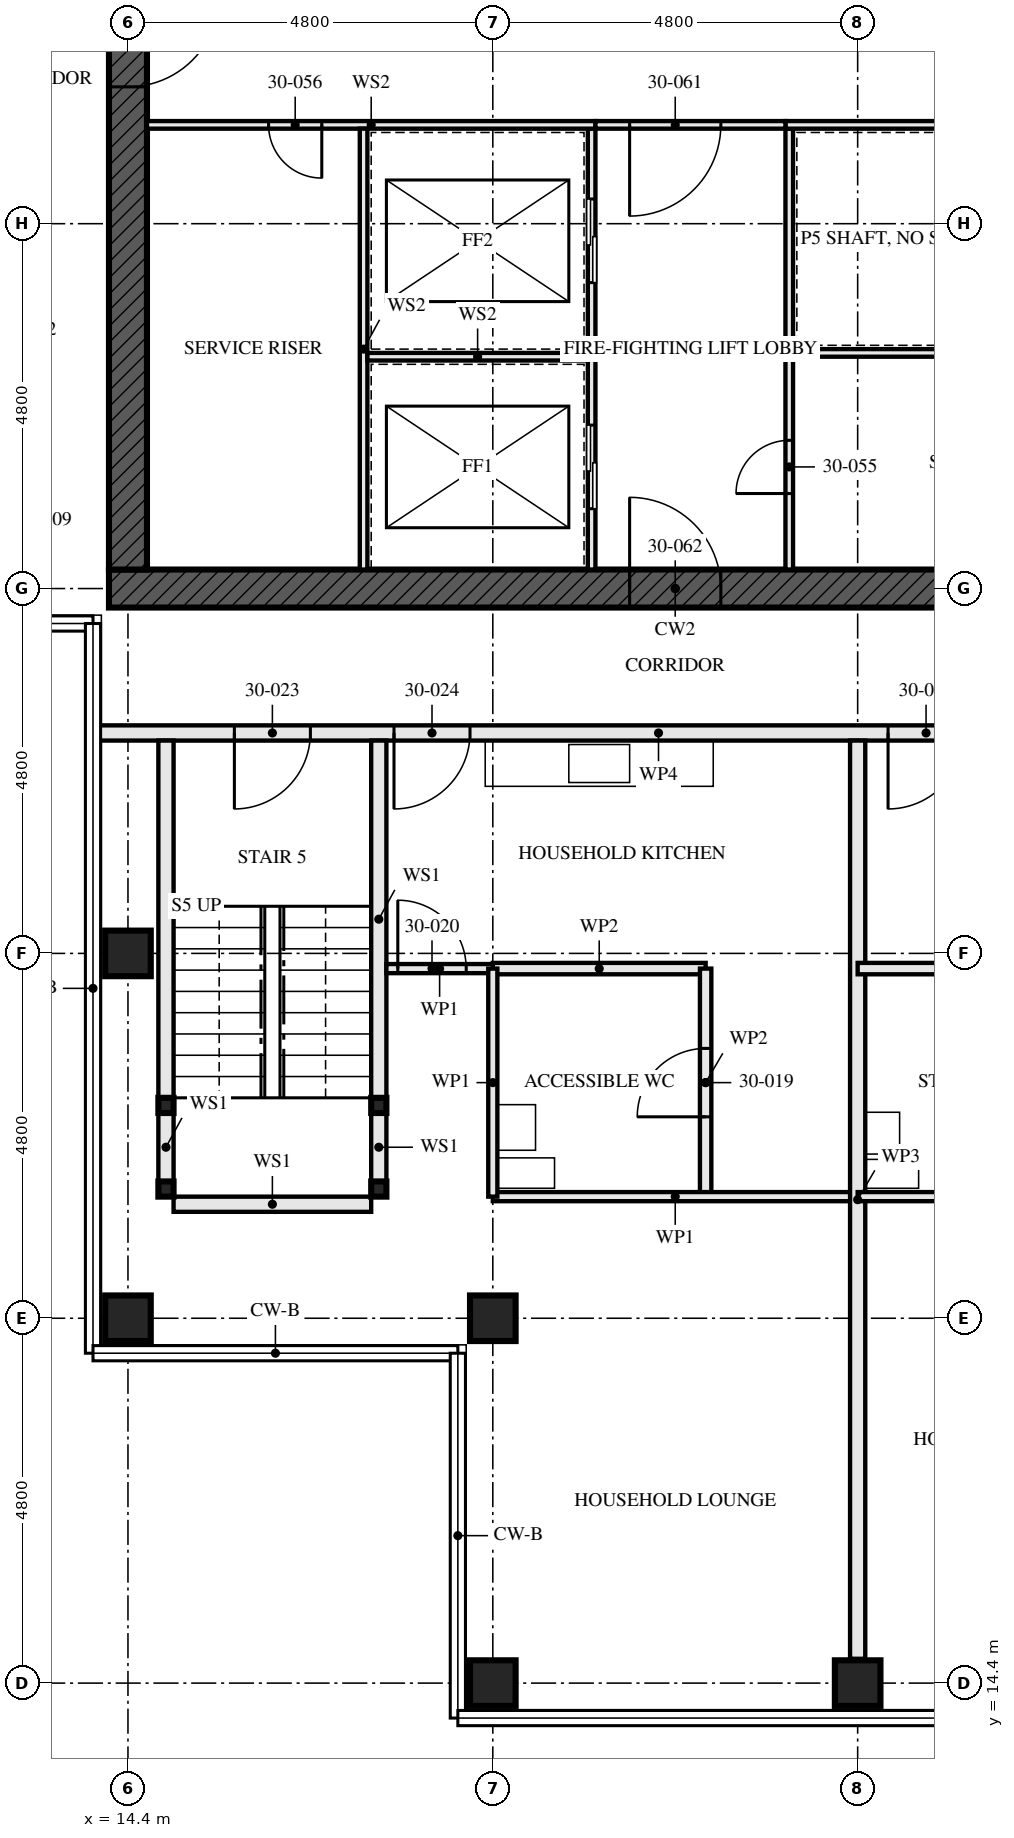
"""IFC4 building model, lengths in metres.
Left out: names, types, materials, properties, quantities, classifications, styles, units other than length and angle.
Written with IfcOpenShell. Run it as: python <this file> out.ifc"""

import sys

from ifc_helpers import new_model, si_unit, direction, frame, frame_2d, origin, origin_2d, place, context, subcontext, project, spatial, rectangle, hollow_rectangle, extrude, element, fill, save


model = new_model("IFC4")
c1 = context("Model", 3, precision=1e-05, world=origin(), true_north=direction((0.0, 1.0)))
c2 = subcontext(c1, "Body", "Model", "MODEL_VIEW")
j1 = project(units=[si_unit("LENGTHUNIT", "METRE"), si_unit("PLANEANGLEUNIT", "RADIAN")], contexts=[c1])
p1 = place(None, origin())
s1 = spatial("IfcSite", under=j1, at=p1, CompositionType="ELEMENT")
p2 = place(p1, origin())
s2 = spatial("IfcBuilding", under=s1, at=p2, CompositionType="ELEMENT")
p3 = place(p2, frame((0.0, 0.0, 112.0)))
s3 = spatial("IfcBuildingStorey", under=s2, at=p3, CompositionType="ELEMENT", Elevation=112.0)
for number, where, z_axis, x_axis in (
    (1, (14.4, 19.2, 0.0), (0.0, 0.0, 1.0), (0.0, 1.0, 0.0)),
    (2, (14.4, 24.0, 0.0), (0.0, 0.0, 1.0), (1.0, 0.0, 0.0)),
    (3, (19.2, 14.4, 0.0), (0.0, 0.0, 1.0), (0.0, 1.0, 0.0)),
    (4, (19.2, 19.2, 0.0), (0.0, 0.0, 1.0), (0.0, 1.0, 0.0)),
    (5, (24.0, 14.4, 0.0), (0.0, 0.0, 1.0), (0.0, 1.0, 0.0)),
):
    element("IfcColumn", number, at=place(p3, frame(where, z_axis=z_axis, x_axis=x_axis)), inside=s3, PredefinedType="COLUMN", context=c2, shape_type="SweptSolid", body=[
        extrude(hollow_rectangle(XDim=0.6, YDim=0.6, WallThickness=0.08, at=origin_2d()), origin(), (0.0, 0.0, 1.0), 3.5),
    ])
p4 = place(p3, frame((14.15, 28.8, -0.17), z_axis=(0.0, 0.0, 1.0), x_axis=(1.0, 0.0, 0.0)))
e6 = element("IfcWall", 6, at=p4, inside=s3, PredefinedType="SHEAR", context=c2, shape_type="SweptSolid", body=[
    extrude(rectangle(XDim=14.9, YDim=0.5, at=frame_2d((7.45, 0.0))), origin(), (0.0, 0.0, 1.0), 3.5),
])
p5 = place(p4, frame((6.85, 0.0, 0.17)))
e7 = element("IfcOpeningElement", 7, at=p5, cuts=e6, PredefinedType="OPENING", context=c2, shape_type="SweptSolid", body=[
    extrude(rectangle(XDim=1.2, YDim=2.1, at=frame_2d((0.6, 1.05))), frame((0.0, 0.26, 0.0), z_axis=(0.0, -1.0, 0.0), x_axis=(1.0, 0.0, 0.0)), (0.0, 0.0, 1.0), 0.521),
])
p6 = place(p3, frame((14.4, 42.95, -0.17), z_axis=(0.0, 0.0, 1.0), x_axis=(0.0, -1.0, 0.0)))
e8 = element("IfcWall", 8, at=p6, inside=s3, PredefinedType="SHEAR", context=c2, shape_type="SweptSolid", body=[
    extrude(rectangle(XDim=13.9, YDim=0.5, at=frame_2d((6.95, 0.0))), origin(), (0.0, 0.0, 1.0), 3.5),
])
p7 = place(p6, frame((6.35, 0.0, 0.17)))
e9 = element("IfcOpeningElement", 9, at=p7, cuts=e8, PredefinedType="OPENING", context=c2, shape_type="SweptSolid", body=[
    extrude(rectangle(XDim=1.2, YDim=2.1, at=frame_2d((0.6, 1.05))), frame((0.0, 0.26, 0.0), z_axis=(0.0, -1.0, 0.0), x_axis=(1.0, 0.0, 0.0)), (0.0, 0.0, 1.0), 0.521),
])
for number, where, z_axis, x_axis in (
    (10, (14.9, 20.9, 0.0), (0.0, 0.0, 1.0), (1.0, 0.0, 0.0)),
    (11, (17.7, 20.9, 0.0), (0.0, 0.0, 1.0), (1.0, 0.0, 0.0)),
    (12, (14.9, 22.0, 0.0), (0.0, 0.0, 1.0), (1.0, 0.0, 0.0)),
    (13, (17.7, 22.0, 0.0), (0.0, 0.0, 1.0), (1.0, 0.0, 0.0)),
):
    element("IfcColumn", number, at=place(p3, frame(where, z_axis=z_axis, x_axis=x_axis)), inside=s3, PredefinedType="COLUMN", context=c2, shape_type="SweptSolid", body=[
        extrude(hollow_rectangle(XDim=0.2, YDim=0.2, WallThickness=0.008, at=origin_2d()), origin(), (0.0, 0.0, 1.0), 3.33),
    ])
p8 = place(p3, frame((14.9, 21.0, 0.0), z_axis=(0.0, 0.0, 1.0), x_axis=(0.0, 1.0, 0.0)))
e14 = element("IfcWall", 14, at=p8, inside=s3, PredefinedType="SOLIDWALL", context=c2, shape_type="SweptSolid", body=[
    extrude(rectangle(XDim=0.9, YDim=0.2, at=frame_2d((0.45, 0.0))), origin(), (0.0, 0.0, 1.0), 2.99),
])
p9 = place(p3, frame((14.9, 22.1, 0.0), z_axis=(0.0, 0.0, 1.0), x_axis=(0.0, 1.0, 0.0)))
e15 = element("IfcWall", 15, at=p9, inside=s3, PredefinedType="SOLIDWALL", context=c2, shape_type="SweptSolid", body=[
    extrude(rectangle(XDim=4.7, YDim=0.2, at=frame_2d((2.35, 0.0))), origin(), (0.0, 0.0, 1.0), 2.99),
])
p10 = place(p3, frame((17.7, 21.0, 0.0), z_axis=(0.0, 0.0, 1.0), x_axis=(0.0, 1.0, 0.0)))
e16 = element("IfcWall", 16, at=p10, inside=s3, PredefinedType="SOLIDWALL", context=c2, shape_type="SweptSolid", body=[
    extrude(rectangle(XDim=0.9, YDim=0.2, at=frame_2d((0.45, 0.0))), origin(), (0.0, 0.0, 1.0), 2.99),
])
p11 = place(p3, frame((17.7, 22.1, 0.0), z_axis=(0.0, 0.0, 1.0), x_axis=(0.0, 1.0, 0.0)))
e17 = element("IfcWall", 17, at=p11, inside=s3, PredefinedType="SOLIDWALL", context=c2, shape_type="SweptSolid", body=[
    extrude(rectangle(XDim=4.7, YDim=0.2, at=frame_2d((2.35, 0.0))), origin(), (0.0, 0.0, 1.0), 2.99),
])
p12 = place(p3, frame((15.0, 20.7, 0.0), z_axis=(0.0, 0.0, 1.0), x_axis=(1.0, 0.0, 0.0)))
e18 = element("IfcWall", 18, at=p12, inside=s3, PredefinedType="SOLIDWALL", context=c2, shape_type="SweptSolid", body=[
    extrude(rectangle(XDim=2.6, YDim=0.2, at=frame_2d((1.3, 0.0))), origin(), (0.0, 0.0, 1.0), 3.33),
])
p13 = place(p3, frame((22.0, 20.8, 0.0), z_axis=(0.0, 0.0, 1.0), x_axis=(0.0, 1.0, 0.0)))
e19 = element("IfcWall", 19, at=p13, inside=s3, PredefinedType="PARTITIONING", context=c2, shape_type="SweptSolid", body=[
    extrude(rectangle(XDim=3.0, YDim=0.15, at=frame_2d((1.5, 0.0))), origin(), (0.0, 0.0, 1.0), 3.33),
])
p14 = place(p13, frame((1.05, 0.0, 0.0)))
e20 = element("IfcOpeningElement", 20, at=p14, cuts=e19, PredefinedType="OPENING", context=c2, shape_type="SweptSolid", body=[
    extrude(rectangle(XDim=0.9, YDim=2.1, at=frame_2d((0.45, 1.05))), frame((0.0, 0.085, 0.0), z_axis=(0.0, -1.0, 0.0), x_axis=(1.0, 0.0, 0.0)), (0.0, 0.0, 1.0), 0.171),
])
p15 = place(p3, frame((19.2, 23.8, 0.0), z_axis=(0.0, 0.0, 1.0), x_axis=(1.0, 0.0, 0.0)))
e21 = element("IfcWall", 21, at=p15, inside=s3, PredefinedType="PARTITIONING", context=c2, shape_type="SweptSolid", body=[
    extrude(rectangle(XDim=2.8, YDim=0.15, at=frame_2d((1.4, 0.0))), origin(), (0.0, 0.0, 1.0), 3.33),
])
p16 = place(p3, frame((17.8, 23.8, 0.0), z_axis=(0.0, 0.0, 1.0), x_axis=(1.0, 0.0, 0.0)))
e22 = element("IfcWall", 22, at=p16, inside=s3, PredefinedType="PARTITIONING", context=c2, shape_type="SweptSolid", body=[
    extrude(rectangle(XDim=1.4, YDim=0.12, at=frame_2d((0.7, 0.0))), origin(), (0.0, 0.0, 1.0), 3.33),
])
p17 = place(p16, frame((0.15, 0.0, 0.0)))
e23 = element("IfcOpeningElement", 23, at=p17, cuts=e22, PredefinedType="OPENING", context=c2, shape_type="SweptSolid", body=[
    extrude(rectangle(XDim=0.9, YDim=2.1, at=frame_2d((0.45, 1.05))), frame((0.0, 0.071, 0.0), z_axis=(0.0, -1.0, 0.0), x_axis=(1.0, 0.0, 0.0)), (0.0, 0.0, 1.0), 0.141),
])
p18 = place(p3, frame((19.2, 20.8, 0.0), z_axis=(0.0, 0.0, 1.0), x_axis=(1.0, 0.0, 0.0)))
e24 = element("IfcWall", 24, at=p18, inside=s3, PredefinedType="PARTITIONING", context=c2, shape_type="SweptSolid", body=[
    extrude(rectangle(XDim=4.8, YDim=0.12, at=frame_2d((2.4, 0.0))), origin(), (0.0, 0.0, 1.0), 3.33),
])
p19 = place(p3, frame((19.2, 20.8, 0.0), z_axis=(0.0, 0.0, 1.0), x_axis=(0.0, 1.0, 0.0)))
e25 = element("IfcWall", 25, at=p19, inside=s3, PredefinedType="PARTITIONING", context=c2, shape_type="SweptSolid", body=[
    extrude(rectangle(XDim=3.0, YDim=0.12, at=frame_2d((1.5, 0.0))), origin(), (0.0, 0.0, 1.0), 2.55),
])
p20 = place(p3, frame((24.0, 14.72, 0.0), z_axis=(0.0, 0.0, 1.0), x_axis=(0.0, 1.0, 0.0)))
e26 = element("IfcWall", 26, at=p20, inside=s3, PredefinedType="PARTITIONING", context=c2, shape_type="SweptSolid", body=[
    extrude(rectangle(XDim=12.08, YDim=0.2, at=frame_2d((6.04, 0.0))), origin(), (0.0, 0.0, 1.0), 2.55),
])
p21 = place(p3, frame((24.0, 23.8, 0.0), z_axis=(0.0, 0.0, 1.0), x_axis=(1.0, 0.0, 0.0)))
e27 = element("IfcWall", 27, at=p21, inside=s3, PredefinedType="PARTITIONING", context=c2, shape_type="SweptSolid", body=[
    extrude(rectangle(XDim=2.8, YDim=0.15, at=frame_2d((1.4, 0.0))), origin(), (0.0, 0.0, 1.0), 3.33),
])
p22 = place(p3, frame((24.0, 20.8, 0.0), z_axis=(0.0, 0.0, 1.0), x_axis=(1.0, 0.0, 0.0)))
e28 = element("IfcWall", 28, at=p22, inside=s3, PredefinedType="PARTITIONING", context=c2, shape_type="SweptSolid", body=[
    extrude(rectangle(XDim=4.8, YDim=0.12, at=frame_2d((2.4, 0.0))), origin(), (0.0, 0.0, 1.0), 3.33),
])
p23 = place(p22, frame((3.45, 0.0, 0.0)))
e29 = element("IfcOpeningElement", 29, at=p23, cuts=e28, PredefinedType="OPENING", context=c2, shape_type="SweptSolid", body=[
    extrude(rectangle(XDim=0.9, YDim=2.1, at=frame_2d((0.45, 1.05))), frame((0.0, 0.071, 0.0), z_axis=(0.0, -1.0, 0.0), x_axis=(1.0, 0.0, 0.0)), (0.0, 0.0, 1.0), 0.141),
])
p24 = place(p3, frame((13.96, 26.9, 0.0), z_axis=(0.0, 0.0, 1.0), x_axis=(1.0, 0.0, 0.0)))
e30 = element("IfcWall", 30, at=p24, inside=s3, PredefinedType="PARTITIONING", context=c2, shape_type="SweptSolid", body=[
    extrude(rectangle(XDim=14.84, YDim=0.2, at=frame_2d((7.42, 0.0))), origin(), (0.0, 0.0, 1.0), 2.32),
])
p25 = place(p24, frame((1.84, 0.0, 0.0)))
e31 = element("IfcOpeningElement", 31, at=p25, cuts=e30, PredefinedType="OPENING", context=c2, shape_type="SweptSolid", body=[
    extrude(rectangle(XDim=1.0, YDim=2.1, at=frame_2d((0.5, 1.05))), frame((0.0, 0.111, 0.0), z_axis=(0.0, -1.0, 0.0), x_axis=(1.0, 0.0, 0.0)), (0.0, 0.0, 1.0), 0.221),
])
p26 = place(p24, frame((3.94, 0.0, 0.0)))
e32 = element("IfcOpeningElement", 32, at=p26, cuts=e30, PredefinedType="OPENING", context=c2, shape_type="SweptSolid", body=[
    extrude(rectangle(XDim=1.0, YDim=2.1, at=frame_2d((0.5, 1.05))), frame((0.0, 0.111, 0.0), z_axis=(0.0, -1.0, 0.0), x_axis=(1.0, 0.0, 0.0)), (0.0, 0.0, 1.0), 0.221),
])
p27 = place(p24, frame((10.44, 0.0, 0.0)))
e33 = element("IfcOpeningElement", 33, at=p27, cuts=e30, PredefinedType="OPENING", context=c2, shape_type="SweptSolid", body=[
    extrude(rectangle(XDim=1.0, YDim=2.1, at=frame_2d((0.5, 1.05))), frame((0.0, 0.111, 0.0), z_axis=(0.0, -1.0, 0.0), x_axis=(1.0, 0.0, 0.0)), (0.0, 0.0, 1.0), 0.221),
])
p28 = place(p3, frame((20.5, 29.05, 0.0), z_axis=(0.0, 0.0, 1.0), x_axis=(0.0, 1.0, 0.0)))
e34 = element("IfcWall", 34, at=p28, inside=s3, PredefinedType="SOLIDWALL", context=c2, shape_type="SweptSolid", body=[
    extrude(rectangle(XDim=5.8, YDim=0.1, at=frame_2d((2.9, 0.0))), origin(), (0.0, 0.0, 1.0), 3.33),
])
p29 = place(p28, frame((0.8, 0.0, 0.0)))
e35 = element("IfcOpeningElement", 35, at=p29, cuts=e34, PredefinedType="OPENING", context=c2, shape_type="SweptSolid", body=[
    extrude(rectangle(XDim=1.1, YDim=2.3, at=frame_2d((0.55, 1.15))), frame((0.0, 0.061, 0.0), z_axis=(0.0, -1.0, 0.0), x_axis=(1.0, 0.0, 0.0)), (0.0, 0.0, 1.0), 0.121),
])
p30 = place(p28, frame((3.775, 0.0, 0.0)))
e36 = element("IfcOpeningElement", 36, at=p30, cuts=e34, PredefinedType="OPENING", context=c2, shape_type="SweptSolid", body=[
    extrude(rectangle(XDim=1.1, YDim=2.3, at=frame_2d((0.55, 1.15))), frame((0.0, 0.061, 0.0), z_axis=(0.0, -1.0, 0.0), x_axis=(1.0, 0.0, 0.0)), (0.0, 0.0, 1.0), 0.121),
])
p31 = place(p3, frame((23.1, 29.05, 0.0), z_axis=(0.0, 0.0, 1.0), x_axis=(0.0, 1.0, 0.0)))
e37 = element("IfcWall", 37, at=p31, inside=s3, PredefinedType="SOLIDWALL", context=c2, shape_type="SweptSolid", body=[
    extrude(rectangle(XDim=5.8, YDim=0.1, at=frame_2d((2.9, 0.0))), origin(), (0.0, 0.0, 1.0), 3.33),
])
p32 = place(p31, frame((1.0, 0.0, 0.0)))
e38 = element("IfcOpeningElement", 38, at=p32, cuts=e37, PredefinedType="OPENING", context=c2, shape_type="SweptSolid", body=[
    extrude(rectangle(XDim=0.7, YDim=2.1, at=frame_2d((0.35, 1.05))), frame((0.0, 0.061, 0.0), z_axis=(0.0, -1.0, 0.0), x_axis=(1.0, 0.0, 0.0)), (0.0, 0.0, 1.0), 0.121),
])
p33 = place(p3, frame((14.65, 34.9, 0.0), z_axis=(0.0, 0.0, 1.0), x_axis=(1.0, 0.0, 0.0)))
e39 = element("IfcWall", 39, at=p33, inside=s3, PredefinedType="SOLIDWALL", context=c2, shape_type="SweptSolid", body=[
    extrude(rectangle(XDim=5.9, YDim=0.1, at=frame_2d((2.95, 0.0))), origin(), (0.0, 0.0, 1.0), 3.33),
])
p34 = place(p33, frame((1.6, 0.0, 0.0)))
e40 = element("IfcOpeningElement", 40, at=p34, cuts=e39, PredefinedType="OPENING", context=c2, shape_type="SweptSolid", body=[
    extrude(rectangle(XDim=0.7, YDim=2.1, at=frame_2d((0.35, 1.05))), frame((0.0, 0.061, 0.0), z_axis=(0.0, -1.0, 0.0), x_axis=(1.0, 0.0, 0.0)), (0.0, 0.0, 1.0), 0.121),
])
p35 = place(p3, frame((23.05, 34.9, 0.0), z_axis=(0.0, 0.0, 1.0), x_axis=(1.0, 0.0, 0.0)))
e41 = element("IfcWall", 41, at=p35, inside=s3, PredefinedType="SOLIDWALL", context=c2, shape_type="SweptSolid", body=[
    extrude(rectangle(XDim=5.5, YDim=0.1, at=frame_2d((2.75, 0.0))), origin(), (0.0, 0.0, 1.0), 3.33),
])
p36 = place(p3, frame((20.55, 34.9, 0.0), z_axis=(0.0, 0.0, 1.0), x_axis=(1.0, 0.0, 0.0)))
e42 = element("IfcWall", 42, at=p36, inside=s3, PredefinedType="SOLIDWALL", context=c2, shape_type="SweptSolid", body=[
    extrude(rectangle(XDim=2.5, YDim=0.1, at=frame_2d((1.25, 0.0))), origin(), (0.0, 0.0, 1.0), 3.33),
])
p37 = place(p36, frame((0.45, 0.0, 0.0)))
e43 = element("IfcOpeningElement", 43, at=p37, cuts=e42, PredefinedType="OPENING", context=c2, shape_type="SweptSolid", body=[
    extrude(rectangle(XDim=1.2, YDim=2.1, at=frame_2d((0.6, 1.05))), frame((0.0, 0.061, 0.0), z_axis=(0.0, -1.0, 0.0), x_axis=(1.0, 0.0, 0.0)), (0.0, 0.0, 1.0), 0.121),
])
p38 = place(p3, frame((17.5, 29.05, 0.0), z_axis=(0.0, 0.0, 1.0), x_axis=(0.0, 1.0, 0.0)))
e44 = element("IfcWall", 44, at=p38, inside=s3, PredefinedType="SOLIDWALL", context=c2, shape_type="SweptSolid", body=[
    extrude(rectangle(XDim=5.8, YDim=0.1, at=frame_2d((2.9, 0.0))), origin(), (0.0, 0.0, 1.0), 3.33),
])
p39 = place(p3, frame((17.55, 31.85, 0.0), z_axis=(0.0, 0.0, 1.0), x_axis=(1.0, 0.0, 0.0)))
e45 = element("IfcWall", 45, at=p39, inside=s3, PredefinedType="SOLIDWALL", context=c2, shape_type="SweptSolid", body=[
    extrude(rectangle(XDim=2.9, YDim=0.1, at=frame_2d((1.45, 0.0))), origin(), (0.0, 0.0, 1.0), 3.33),
])
p40 = place(p3, frame((23.15, 31.9, 0.0), z_axis=(0.0, 0.0, 1.0), x_axis=(1.0, 0.0, 0.0)))
e46 = element("IfcWall", 46, at=p40, inside=s3, PredefinedType="SOLIDWALL", context=c2, shape_type="SweptSolid", body=[
    extrude(rectangle(XDim=5.4, YDim=0.1, at=frame_2d((2.7, 0.0))), origin(), (0.0, 0.0, 1.0), 3.33),
])
p41 = place(p14, origin())
e47 = element("IfcDoor", 47, at=p41, inside=s3, OperationType="SINGLE_SWING_RIGHT", PredefinedType="DOOR", context=c2, shape_type="SweptSolid", body=[
    extrude(rectangle(XDim=0.9, YDim=2.1, at=frame_2d((0.45, 1.05))), frame((0.0, 0.022, 0.0), z_axis=(0.0, -1.0, 0.0), x_axis=(1.0, 0.0, 0.0)), (0.0, 0.0, 1.0), 0.044),
])
fill(e20, e47)
p42 = place(p17, origin())
e48 = element("IfcDoor", 48, at=p42, inside=s3, OperationType="SINGLE_SWING_RIGHT", PredefinedType="DOOR", context=c2, shape_type="SweptSolid", body=[
    extrude(rectangle(XDim=0.9, YDim=2.1, at=frame_2d((0.45, 1.05))), frame((0.0, 0.022, 0.0), z_axis=(0.0, -1.0, 0.0), x_axis=(1.0, 0.0, 0.0)), (0.0, 0.0, 1.0), 0.044),
])
fill(e23, e48)
p43 = place(p25, frame((1.0, 0.0, 0.0), z_axis=(0.0, 0.0, 1.0), x_axis=(-1.0, 0.0, 0.0)))
e49 = element("IfcDoor", 49, at=p43, inside=s3, OperationType="SINGLE_SWING_LEFT", PredefinedType="DOOR", context=c2, shape_type="SweptSolid", body=[
    extrude(rectangle(XDim=1.0, YDim=2.1, at=frame_2d((0.5, 1.05))), frame((0.0, 0.032, 0.0), z_axis=(0.0, -1.0, 0.0), x_axis=(1.0, 0.0, 0.0)), (0.0, 0.0, 1.0), 0.064),
])
fill(e31, e49)
p44 = place(p26, frame((1.0, 0.0, 0.0), z_axis=(0.0, 0.0, 1.0), x_axis=(-1.0, 0.0, 0.0)))
e50 = element("IfcDoor", 50, at=p44, inside=s3, OperationType="SINGLE_SWING_LEFT", PredefinedType="DOOR", context=c2, shape_type="SweptSolid", body=[
    extrude(rectangle(XDim=1.0, YDim=2.1, at=frame_2d((0.5, 1.05))), frame((0.0, 0.027, 0.0), z_axis=(0.0, -1.0, 0.0), x_axis=(1.0, 0.0, 0.0)), (0.0, 0.0, 1.0), 0.054),
])
fill(e32, e50)
p45 = place(p27, frame((1.0, 0.0, 0.0), z_axis=(0.0, 0.0, 1.0), x_axis=(-1.0, 0.0, 0.0)))
e51 = element("IfcDoor", 51, at=p45, inside=s3, OperationType="SINGLE_SWING_LEFT", PredefinedType="DOOR", context=c2, shape_type="SweptSolid", body=[
    extrude(rectangle(XDim=1.0, YDim=2.1, at=frame_2d((0.5, 1.05))), frame((0.0, 0.027, 0.0), z_axis=(0.0, -1.0, 0.0), x_axis=(1.0, 0.0, 0.0)), (0.0, 0.0, 1.0), 0.054),
])
fill(e33, e51)
p46 = place(p29, origin())
e52 = element("IfcDoor", 52, at=p46, inside=s3, OperationType="SLIDING_TO_LEFT", PredefinedType="DOOR", context=c2, shape_type="SweptSolid", body=[
    extrude(rectangle(XDim=1.1, YDim=2.3, at=frame_2d((0.55, 1.15))), frame((0.0, 0.05, 0.0), z_axis=(0.0, -1.0, 0.0), x_axis=(1.0, 0.0, 0.0)), (0.0, 0.0, 1.0), 0.1),
])
fill(e35, e52)
p47 = place(p30, origin())
e53 = element("IfcDoor", 53, at=p47, inside=s3, OperationType="SLIDING_TO_LEFT", PredefinedType="DOOR", context=c2, shape_type="SweptSolid", body=[
    extrude(rectangle(XDim=1.1, YDim=2.3, at=frame_2d((0.55, 1.15))), frame((0.0, 0.05, 0.0), z_axis=(0.0, -1.0, 0.0), x_axis=(1.0, 0.0, 0.0)), (0.0, 0.0, 1.0), 0.1),
])
fill(e36, e53)
p48 = place(p32, origin())
e54 = element("IfcDoor", 54, at=p48, inside=s3, OperationType="SINGLE_SWING_RIGHT", PredefinedType="DOOR", context=c2, shape_type="SweptSolid", body=[
    extrude(rectangle(XDim=0.7, YDim=2.1, at=frame_2d((0.35, 1.05))), frame((0.0, 0.027, 0.0), z_axis=(0.0, -1.0, 0.0), x_axis=(1.0, 0.0, 0.0)), (0.0, 0.0, 1.0), 0.054),
])
fill(e38, e54)
p49 = place(p34, frame((0.7, 0.0, 0.0), z_axis=(0.0, 0.0, 1.0), x_axis=(-1.0, 0.0, 0.0)))
e55 = element("IfcDoor", 55, at=p49, inside=s3, OperationType="SINGLE_SWING_RIGHT", PredefinedType="DOOR", context=c2, shape_type="SweptSolid", body=[
    extrude(rectangle(XDim=0.7, YDim=2.1, at=frame_2d((0.35, 1.05))), frame((0.0, 0.027, 0.0), z_axis=(0.0, -1.0, 0.0), x_axis=(1.0, 0.0, 0.0)), (0.0, 0.0, 1.0), 0.054),
])
fill(e40, e55)
p50 = place(p37, frame((1.2, 0.0, 0.0), z_axis=(0.0, 0.0, 1.0), x_axis=(-1.0, 0.0, 0.0)))
e56 = element("IfcDoor", 56, at=p50, inside=s3, OperationType="SINGLE_SWING_LEFT", PredefinedType="DOOR", context=c2, shape_type="SweptSolid", body=[
    extrude(rectangle(XDim=1.2, YDim=2.1, at=frame_2d((0.6, 1.05))), frame((0.0, 0.027, 0.0), z_axis=(0.0, -1.0, 0.0), x_axis=(1.0, 0.0, 0.0)), (0.0, 0.0, 1.0), 0.054),
])
fill(e43, e56)
p51 = place(p5, origin())
e57 = element("IfcDoor", 57, at=p51, inside=s3, OperationType="SINGLE_SWING_LEFT", PredefinedType="DOOR", context=c2, shape_type="SweptSolid", body=[
    extrude(rectangle(XDim=1.2, YDim=2.1, at=frame_2d((0.6, 1.05))), frame((0.0, 0.027, 0.0), z_axis=(0.0, -1.0, 0.0), x_axis=(1.0, 0.0, 0.0)), (0.0, 0.0, 1.0), 0.054),
])
fill(e7, e57)
p52 = place(p7, origin())
e58 = element("IfcDoor", 58, at=p52, inside=s3, OperationType="SINGLE_SWING_LEFT", PredefinedType="DOOR", context=c2, shape_type="SweptSolid", body=[
    extrude(rectangle(XDim=1.2, YDim=2.1, at=frame_2d((0.6, 1.05))), frame((0.0, 0.027, 0.0), z_axis=(0.0, -1.0, 0.0), x_axis=(1.0, 0.0, 0.0)), (0.0, 0.0, 1.0), 0.054),
])
fill(e9, e58)
save(model, sys.argv[1])
